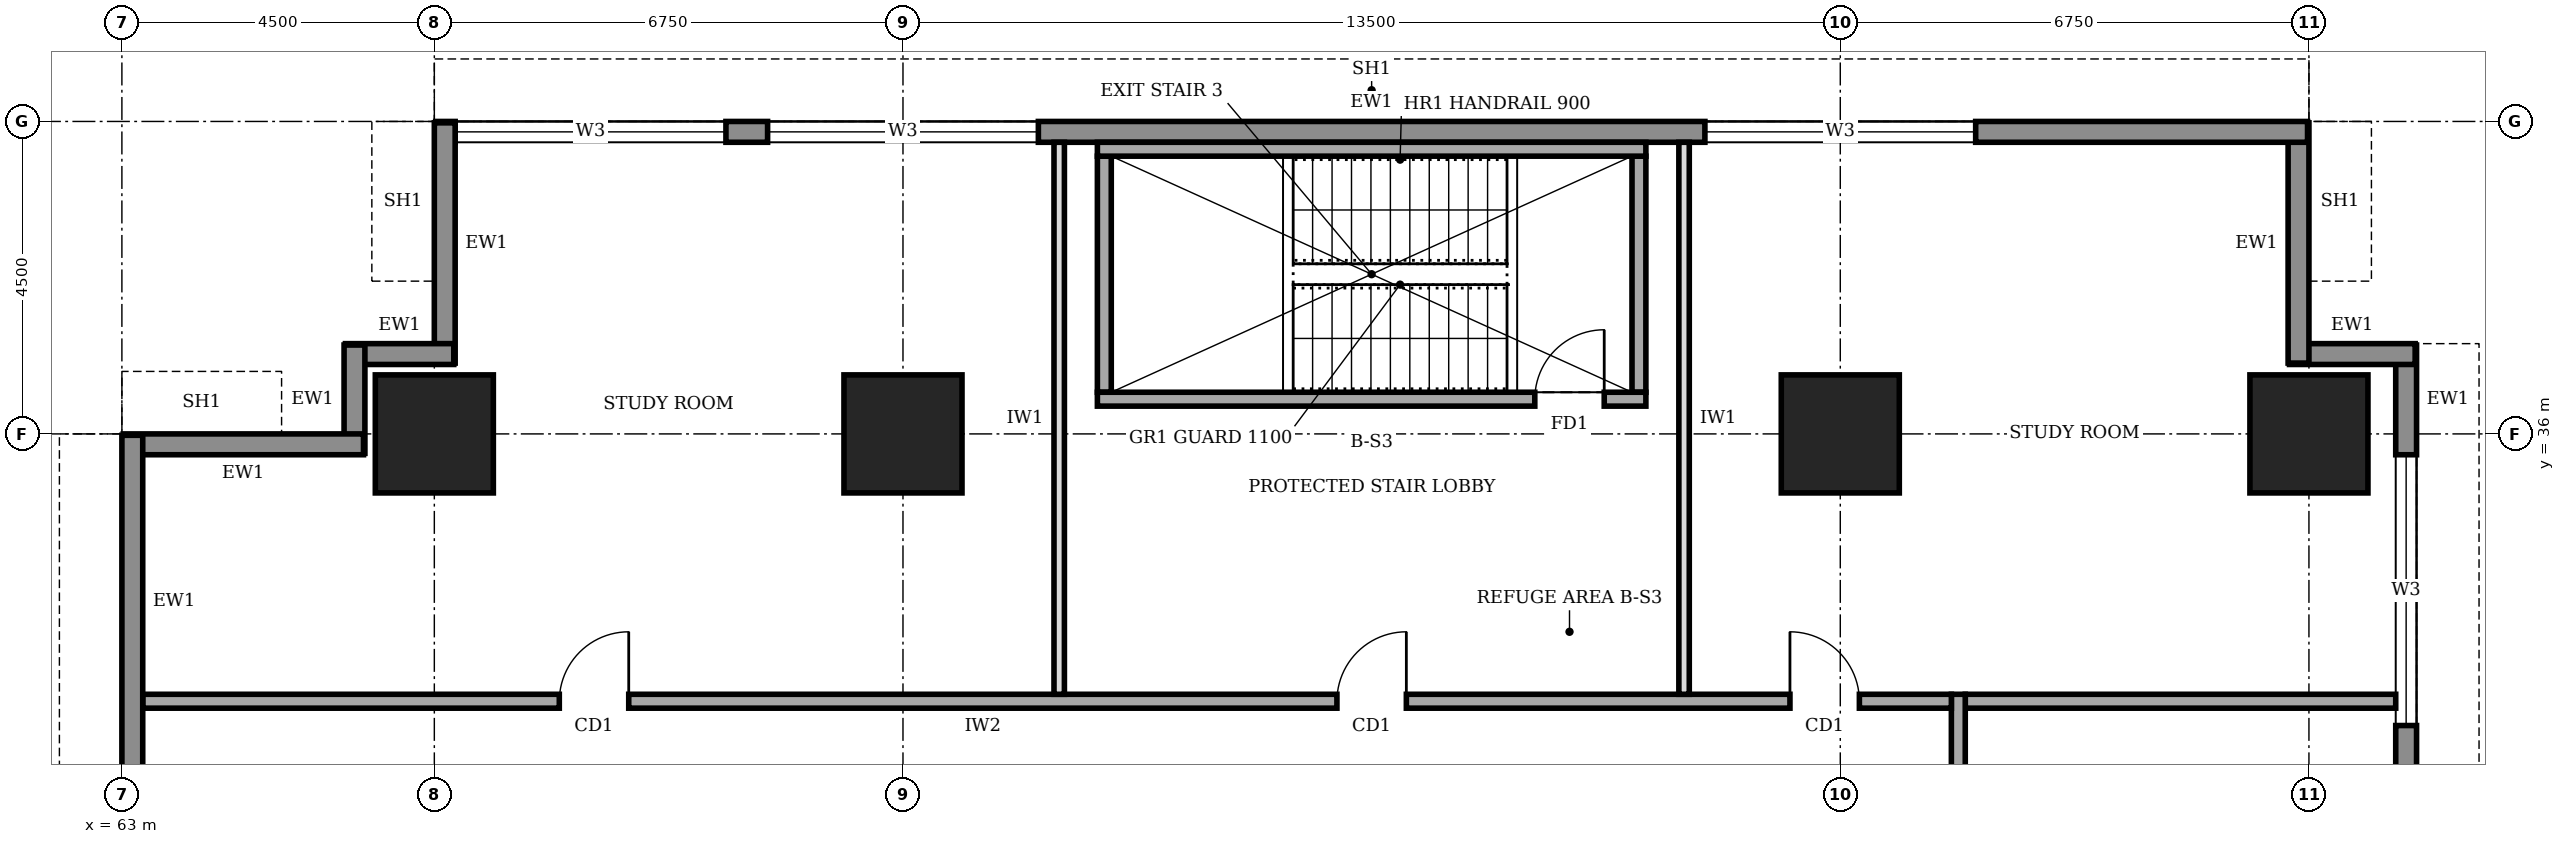
"""IFC4 building model, lengths in metres.
Left out: names, types, materials, properties, quantities, classifications, styles, units other than length and angle.
Written with IfcOpenShell. Run it as: python <this file> out.ifc"""

import sys

from ifc_helpers import new_model, si_unit, direction, frame, frame_2d, origin, origin_2d, place, context, subcontext, project, spatial, rectangle, extrude, element, fill, save


model = new_model("IFC4")
c1 = context("Model", 3, precision=1e-05, world=origin(), true_north=direction((0.0, 1.0)))
c2 = subcontext(c1, "Body", "Model", "MODEL_VIEW")
j1 = project(units=[si_unit("LENGTHUNIT", "METRE"), si_unit("PLANEANGLEUNIT", "RADIAN")], contexts=[c1])
p1 = place(None, origin())
s1 = spatial("IfcSite", under=j1, at=p1, CompositionType="ELEMENT")
p2 = place(p1, origin())
s2 = spatial("IfcBuilding", under=s1, at=p2, CompositionType="ELEMENT")
p3 = place(p2, frame((0.0, 0.0, 97.0)))
s3 = spatial("IfcBuildingStorey", under=s2, at=p3, CompositionType="ELEMENT", Elevation=97.0)
for number, where, z_axis, x_axis in (
    (1, (67.5, 36.0, 0.0), (0.0, 0.0, 1.0), (1.0, 0.0, 0.0)),
    (2, (74.25, 36.0, 0.0), (0.0, 0.0, 1.0), (1.0, 0.0, 0.0)),
    (3, (87.75, 36.0, 0.0), (0.0, 0.0, 1.0), (1.0, 0.0, 0.0)),
    (4, (94.5, 36.0, 0.0), (0.0, 0.0, 1.0), (1.0, 0.0, 0.0)),
):
    element("IfcColumn", number, at=place(p3, frame(where, z_axis=z_axis, x_axis=x_axis)), inside=s3, PredefinedType="COLUMN", context=c2, shape_type="SweptSolid", body=[
        extrude(rectangle(XDim=1.7, YDim=1.7, at=origin_2d()), origin(), (0.0, 0.0, 1.0), 4.0),
    ])
p4 = place(p3, frame((95.9, 3.32, 0.0), z_axis=(0.0, 0.0, 1.0), x_axis=(0.0, 1.0, 0.0)))
e5 = element("IfcWall", 5, at=p4, inside=s3, PredefinedType="STANDARD", context=c2, shape_type="SweptSolid", body=[
    extrude(rectangle(XDim=33.96, YDim=0.3, at=frame_2d((16.98, 0.0))), origin(), (0.0, 0.0, 1.0), 3.75),
])
p5 = place(p4, frame((1.48, 0.0, 0.95)))
e6 = element("IfcOpeningElement", 6, at=p5, cuts=e5, PredefinedType="OPENING", context=c2, shape_type="SweptSolid", body=[
    extrude(rectangle(XDim=3.9, YDim=1.8, at=frame_2d((1.95, 0.9))), frame((0.0, 0.16, 0.0), z_axis=(0.0, -1.0, 0.0), x_axis=(1.0, 0.0, 0.0)), (0.0, 0.0, 1.0), 0.32),
])
p6 = place(p4, frame((5.98, 0.0, 0.95)))
e7 = element("IfcOpeningElement", 7, at=p6, cuts=e5, PredefinedType="OPENING", context=c2, shape_type="SweptSolid", body=[
    extrude(rectangle(XDim=3.9, YDim=1.8, at=frame_2d((1.95, 0.9))), frame((0.0, 0.16, 0.0), z_axis=(0.0, -1.0, 0.0), x_axis=(1.0, 0.0, 0.0)), (0.0, 0.0, 1.0), 0.32),
])
p7 = place(p4, frame((10.48, 0.0, 0.95)))
e8 = element("IfcOpeningElement", 8, at=p7, cuts=e5, PredefinedType="OPENING", context=c2, shape_type="SweptSolid", body=[
    extrude(rectangle(XDim=3.9, YDim=1.8, at=frame_2d((1.95, 0.9))), frame((0.0, 0.16, 0.0), z_axis=(0.0, -1.0, 0.0), x_axis=(1.0, 0.0, 0.0)), (0.0, 0.0, 1.0), 0.32),
])
p8 = place(p4, frame((14.98, 0.0, 0.95)))
e9 = element("IfcOpeningElement", 9, at=p8, cuts=e5, PredefinedType="OPENING", context=c2, shape_type="SweptSolid", body=[
    extrude(rectangle(XDim=3.9, YDim=1.8, at=frame_2d((1.95, 0.9))), frame((0.0, 0.16, 0.0), z_axis=(0.0, -1.0, 0.0), x_axis=(1.0, 0.0, 0.0)), (0.0, 0.0, 1.0), 0.32),
])
p9 = place(p4, frame((19.48, 0.0, 0.95)))
e10 = element("IfcOpeningElement", 10, at=p9, cuts=e5, PredefinedType="OPENING", context=c2, shape_type="SweptSolid", body=[
    extrude(rectangle(XDim=3.9, YDim=1.8, at=frame_2d((1.95, 0.9))), frame((0.0, 0.16, 0.0), z_axis=(0.0, -1.0, 0.0), x_axis=(1.0, 0.0, 0.0)), (0.0, 0.0, 1.0), 0.32),
])
p10 = place(p4, frame((23.98, 0.0, 0.95)))
e11 = element("IfcOpeningElement", 11, at=p10, cuts=e5, PredefinedType="OPENING", context=c2, shape_type="SweptSolid", body=[
    extrude(rectangle(XDim=3.9, YDim=1.8, at=frame_2d((1.95, 0.9))), frame((0.0, 0.16, 0.0), z_axis=(0.0, -1.0, 0.0), x_axis=(1.0, 0.0, 0.0)), (0.0, 0.0, 1.0), 0.32),
])
p11 = place(p4, frame((28.48, 0.0, 0.95)))
e12 = element("IfcOpeningElement", 12, at=p11, cuts=e5, PredefinedType="OPENING", context=c2, shape_type="SweptSolid", body=[
    extrude(rectangle(XDim=3.9, YDim=1.8, at=frame_2d((1.95, 0.9))), frame((0.0, 0.16, 0.0), z_axis=(0.0, -1.0, 0.0), x_axis=(1.0, 0.0, 0.0)), (0.0, 0.0, 1.0), 0.32),
])
p12 = place(p3, frame((96.03, 37.15, 0.0), z_axis=(0.0, 0.0, 1.0), x_axis=(-1.0, 0.0, 0.0)))
e13 = element("IfcWall", 13, at=p12, inside=s3, PredefinedType="STANDARD", context=c2, shape_type="SweptSolid", body=[
    extrude(rectangle(XDim=1.81, YDim=0.3, at=frame_2d((0.905, 0.0))), origin(), (0.0, 0.0, 1.0), 3.75),
])
p13 = place(p3, frame((94.35, 37.02, 0.0), z_axis=(0.0, 0.0, 1.0), x_axis=(0.0, 1.0, 0.0)))
e14 = element("IfcWall", 14, at=p13, inside=s3, PredefinedType="STANDARD", context=c2, shape_type="SweptSolid", body=[
    extrude(rectangle(XDim=3.46, YDim=0.3, at=frame_2d((1.73, 0.0))), origin(), (0.0, 0.0, 1.0), 2.85),
])
p14 = place(p3, frame((94.48, 40.35, 0.0), z_axis=(0.0, 0.0, 1.0), x_axis=(-1.0, 0.0, 0.0)))
e15 = element("IfcWall", 15, at=p14, inside=s3, PredefinedType="STANDARD", context=c2, shape_type="SweptSolid", body=[
    extrude(rectangle(XDim=26.96, YDim=0.3, at=frame_2d((13.48, 0.0))), origin(), (0.0, 0.0, 1.0), 3.75),
])
p15 = place(p14, frame((22.78, 0.0, 0.95)))
e16 = element("IfcOpeningElement", 16, at=p15, cuts=e15, PredefinedType="OPENING", context=c2, shape_type="SweptSolid", body=[
    extrude(rectangle(XDim=3.9, YDim=1.8, at=frame_2d((1.95, 0.9))), frame((0.0, 0.16, 0.0), z_axis=(0.0, -1.0, 0.0), x_axis=(1.0, 0.0, 0.0)), (0.0, 0.0, 1.0), 0.32),
])
p16 = place(p14, frame((18.28, 0.0, 0.95)))
e17 = element("IfcOpeningElement", 17, at=p16, cuts=e15, PredefinedType="OPENING", context=c2, shape_type="SweptSolid", body=[
    extrude(rectangle(XDim=3.9, YDim=1.8, at=frame_2d((1.95, 0.9))), frame((0.0, 0.16, 0.0), z_axis=(0.0, -1.0, 0.0), x_axis=(1.0, 0.0, 0.0)), (0.0, 0.0, 1.0), 0.32),
])
p17 = place(p14, frame((4.78, 0.0, 0.95)))
e18 = element("IfcOpeningElement", 18, at=p17, cuts=e15, PredefinedType="OPENING", context=c2, shape_type="SweptSolid", body=[
    extrude(rectangle(XDim=3.9, YDim=1.8, at=frame_2d((1.95, 0.9))), frame((0.0, 0.16, 0.0), z_axis=(0.0, -1.0, 0.0), x_axis=(1.0, 0.0, 0.0)), (0.0, 0.0, 1.0), 0.32),
])
p18 = place(p3, frame((67.65, 40.48, 0.0), z_axis=(0.0, 0.0, 1.0), x_axis=(0.0, -1.0, 0.0)))
e19 = element("IfcWall", 19, at=p18, inside=s3, PredefinedType="STANDARD", context=c2, shape_type="SweptSolid", body=[
    extrude(rectangle(XDim=3.46, YDim=0.3, at=frame_2d((1.73, 0.0))), origin(), (0.0, 0.0, 1.0), 2.85),
])
for number, where, z_axis, x_axis in (
    (20, (67.78, 37.15, 0.0), (0.0, 0.0, 1.0), (-1.0, 0.0, 0.0)),
    (21, (66.35, 37.28, 0.0), (0.0, 0.0, 1.0), (0.0, -1.0, 0.0)),
):
    element("IfcWall", number, at=place(p3, frame(where, z_axis=z_axis, x_axis=x_axis)), inside=s3, PredefinedType="STANDARD", context=c2, shape_type="SweptSolid", body=[
        extrude(rectangle(XDim=1.56, YDim=0.3, at=frame_2d((0.78, 0.0))), origin(), (0.0, 0.0, 1.0), 3.75),
    ])
p19 = place(p3, frame((66.48, 35.85, 0.0), z_axis=(0.0, 0.0, 1.0), x_axis=(-1.0, 0.0, 0.0)))
e22 = element("IfcWall", 22, at=p19, inside=s3, PredefinedType="STANDARD", context=c2, shape_type="SweptSolid", body=[
    extrude(rectangle(XDim=3.46, YDim=0.3, at=frame_2d((1.73, 0.0))), origin(), (0.0, 0.0, 1.0), 2.85),
])
p20 = place(p3, frame((63.15, 35.98, 0.0), z_axis=(0.0, 0.0, 1.0), x_axis=(0.0, -1.0, 0.0)))
e23 = element("IfcWall", 23, at=p20, inside=s3, PredefinedType="STANDARD", context=c2, shape_type="SweptSolid", body=[
    extrude(rectangle(XDim=31.46, YDim=0.3, at=frame_2d((15.73, 0.0))), origin(), (0.0, 0.0, 1.0), 3.75),
])
p21 = place(p20, frame((27.28, 0.0, 0.95)))
e24 = element("IfcOpeningElement", 24, at=p21, cuts=e23, PredefinedType="OPENING", context=c2, shape_type="SweptSolid", body=[
    extrude(rectangle(XDim=3.9, YDim=1.8, at=frame_2d((1.95, 0.9))), frame((0.0, 0.16, 0.0), z_axis=(0.0, -1.0, 0.0), x_axis=(1.0, 0.0, 0.0)), (0.0, 0.0, 1.0), 0.32),
])
p22 = place(p20, frame((22.78, 0.0, 0.95)))
e25 = element("IfcOpeningElement", 25, at=p22, cuts=e23, PredefinedType="OPENING", context=c2, shape_type="SweptSolid", body=[
    extrude(rectangle(XDim=3.9, YDim=1.8, at=frame_2d((1.95, 0.9))), frame((0.0, 0.16, 0.0), z_axis=(0.0, -1.0, 0.0), x_axis=(1.0, 0.0, 0.0)), (0.0, 0.0, 1.0), 0.32),
])
p23 = place(p20, frame((18.28, 0.0, 0.95)))
e26 = element("IfcOpeningElement", 26, at=p23, cuts=e23, PredefinedType="OPENING", context=c2, shape_type="SweptSolid", body=[
    extrude(rectangle(XDim=3.9, YDim=1.8, at=frame_2d((1.95, 0.9))), frame((0.0, 0.16, 0.0), z_axis=(0.0, -1.0, 0.0), x_axis=(1.0, 0.0, 0.0)), (0.0, 0.0, 1.0), 0.32),
])
p24 = place(p20, frame((13.78, 0.0, 0.95)))
e27 = element("IfcOpeningElement", 27, at=p24, cuts=e23, PredefinedType="OPENING", context=c2, shape_type="SweptSolid", body=[
    extrude(rectangle(XDim=3.9, YDim=1.8, at=frame_2d((1.95, 0.9))), frame((0.0, 0.16, 0.0), z_axis=(0.0, -1.0, 0.0), x_axis=(1.0, 0.0, 0.0)), (0.0, 0.0, 1.0), 0.32),
])
p25 = place(p20, frame((9.28, 0.0, 0.95)))
e28 = element("IfcOpeningElement", 28, at=p25, cuts=e23, PredefinedType="OPENING", context=c2, shape_type="SweptSolid", body=[
    extrude(rectangle(XDim=3.9, YDim=1.8, at=frame_2d((1.95, 0.9))), frame((0.0, 0.16, 0.0), z_axis=(0.0, -1.0, 0.0), x_axis=(1.0, 0.0, 0.0)), (0.0, 0.0, 1.0), 0.32),
])
p26 = place(p20, frame((4.78, 0.0, 0.95)))
e29 = element("IfcOpeningElement", 29, at=p26, cuts=e23, PredefinedType="OPENING", context=c2, shape_type="SweptSolid", body=[
    extrude(rectangle(XDim=3.9, YDim=1.8, at=frame_2d((1.95, 0.9))), frame((0.0, 0.16, 0.0), z_axis=(0.0, -1.0, 0.0), x_axis=(1.0, 0.0, 0.0)), (0.0, 0.0, 1.0), 0.32),
])
p27 = place(p3, frame((89.45, 8.45, 0.0), z_axis=(0.0, 0.0, 1.0), x_axis=(0.0, 1.0, 0.0)))
e30 = element("IfcWall", 30, at=p27, inside=s3, PredefinedType="SOLIDWALL", context=c2, shape_type="SweptSolid", body=[
    extrude(rectangle(XDim=23.8, YDim=0.2, at=frame_2d((11.9, 0.0))), origin(), (0.0, 0.0, 1.0), 3.75),
])
p28 = place(p27, frame((1.925, 0.0, 0.0)))
e31 = element("IfcOpeningElement", 31, at=p28, cuts=e30, PredefinedType="OPENING", context=c2, shape_type="SweptSolid", body=[
    extrude(rectangle(XDim=1.0, YDim=2.1, at=frame_2d((0.5, 1.05))), frame((0.0, 0.11, 0.0), z_axis=(0.0, -1.0, 0.0), x_axis=(1.0, 0.0, 0.0)), (0.0, 0.0, 1.0), 0.22),
])
p29 = place(p27, frame((6.5, 0.0, 0.0)))
e32 = element("IfcOpeningElement", 32, at=p29, cuts=e30, PredefinedType="OPENING", context=c2, shape_type="SweptSolid", body=[
    extrude(rectangle(XDim=0.9, YDim=2.1, at=frame_2d((0.45, 1.05))), frame((0.0, 0.11, 0.0), z_axis=(0.0, -1.0, 0.0), x_axis=(1.0, 0.0, 0.0)), (0.0, 0.0, 1.0), 0.22),
])
p30 = place(p27, frame((9.5, 0.0, 0.0)))
e33 = element("IfcOpeningElement", 33, at=p30, cuts=e30, PredefinedType="OPENING", context=c2, shape_type="SweptSolid", body=[
    extrude(rectangle(XDim=0.9, YDim=2.1, at=frame_2d((0.45, 1.05))), frame((0.0, 0.11, 0.0), z_axis=(0.0, -1.0, 0.0), x_axis=(1.0, 0.0, 0.0)), (0.0, 0.0, 1.0), 0.22),
])
p31 = place(p27, frame((14.35, 0.0, 0.0)))
e34 = element("IfcOpeningElement", 34, at=p31, cuts=e30, PredefinedType="OPENING", context=c2, shape_type="SweptSolid", body=[
    extrude(rectangle(XDim=0.9, YDim=2.1, at=frame_2d((0.45, 1.05))), frame((0.0, 0.11, 0.0), z_axis=(0.0, -1.0, 0.0), x_axis=(1.0, 0.0, 0.0)), (0.0, 0.0, 1.0), 0.22),
])
p32 = place(p27, frame((17.05, 0.0, 0.0)))
e35 = element("IfcOpeningElement", 35, at=p32, cuts=e30, PredefinedType="OPENING", context=c2, shape_type="SweptSolid", body=[
    extrude(rectangle(XDim=1.0, YDim=2.1, at=frame_2d((0.5, 1.05))), frame((0.0, 0.11, 0.0), z_axis=(0.0, -1.0, 0.0), x_axis=(1.0, 0.0, 0.0)), (0.0, 0.0, 1.0), 0.22),
])
p33 = place(p27, frame((11.55, 0.0, 0.0)))
e36 = element("IfcOpeningElement", 36, at=p33, cuts=e30, PredefinedType="OPENING", context=c2, shape_type="SweptSolid", body=[
    extrude(rectangle(XDim=1.0, YDim=2.1, at=frame_2d((0.5, 1.05))), frame((0.0, 0.11, 0.0), z_axis=(0.0, -1.0, 0.0), x_axis=(1.0, 0.0, 0.0)), (0.0, 0.0, 1.0), 0.22),
])
p34 = place(p27, frame((20.675, 0.0, 0.0)))
e37 = element("IfcOpeningElement", 37, at=p34, cuts=e30, PredefinedType="OPENING", context=c2, shape_type="SweptSolid", body=[
    extrude(rectangle(XDim=1.0, YDim=2.1, at=frame_2d((0.5, 1.05))), frame((0.0, 0.11, 0.0), z_axis=(0.0, -1.0, 0.0), x_axis=(1.0, 0.0, 0.0)), (0.0, 0.0, 1.0), 0.22),
])
p35 = place(p3, frame((89.35, 32.15, 0.0), z_axis=(0.0, 0.0, 1.0), x_axis=(-1.0, 0.0, 0.0)))
e38 = element("IfcWall", 38, at=p35, inside=s3, PredefinedType="SOLIDWALL", context=c2, shape_type="SweptSolid", body=[
    extrude(rectangle(XDim=26.05, YDim=0.2, at=frame_2d((13.025, 0.0))), origin(), (0.0, 0.0, 1.0), 3.75),
])
p36 = place(p35, frame((19.05, 0.0, 0.0)))
e39 = element("IfcOpeningElement", 39, at=p36, cuts=e38, PredefinedType="OPENING", context=c2, shape_type="SweptSolid", body=[
    extrude(rectangle(XDim=1.0, YDim=2.1, at=frame_2d((0.5, 1.05))), frame((0.0, 0.11, 0.0), z_axis=(0.0, -1.0, 0.0), x_axis=(1.0, 0.0, 0.0)), (0.0, 0.0, 1.0), 0.22),
])
p37 = place(p35, frame((7.85, 0.0, 0.0)))
e40 = element("IfcOpeningElement", 40, at=p37, cuts=e38, PredefinedType="OPENING", context=c2, shape_type="SweptSolid", body=[
    extrude(rectangle(XDim=1.0, YDim=2.1, at=frame_2d((0.5, 1.05))), frame((0.0, 0.11, 0.0), z_axis=(0.0, -1.0, 0.0), x_axis=(1.0, 0.0, 0.0)), (0.0, 0.0, 1.0), 0.22),
])
p38 = place(p35, frame((1.325, 0.0, 0.0)))
e41 = element("IfcOpeningElement", 41, at=p38, cuts=e38, PredefinedType="OPENING", context=c2, shape_type="SweptSolid", body=[
    extrude(rectangle(XDim=1.0, YDim=2.1, at=frame_2d((0.5, 1.05))), frame((0.0, 0.11, 0.0), z_axis=(0.0, -1.0, 0.0), x_axis=(1.0, 0.0, 0.0)), (0.0, 0.0, 1.0), 0.22),
])
p39 = place(p3, frame((89.55, 32.15, 0.0), z_axis=(0.0, 0.0, 1.0), x_axis=(1.0, 0.0, 0.0)))
e42 = element("IfcWall", 42, at=p39, inside=s3, PredefinedType="SOLIDWALL", context=c2, shape_type="SweptSolid", body=[
    extrude(rectangle(XDim=6.2, YDim=0.2, at=frame_2d((3.1, 0.0))), origin(), (0.0, 0.0, 1.0), 3.75),
])
for number, where, z_axis, x_axis in (
    (43, (76.5, 32.25, 0.0), (0.0, 0.0, 1.0), (0.0, 1.0, 0.0)),
    (44, (85.5, 32.25, 0.0), (0.0, 0.0, 1.0), (0.0, 1.0, 0.0)),
):
    element("IfcWall", number, at=place(p3, frame(where, z_axis=z_axis, x_axis=x_axis)), inside=s3, PredefinedType="PARTITIONING", context=c2, shape_type="SweptSolid", body=[
        extrude(rectangle(XDim=7.95, YDim=0.15, at=frame_2d((3.975, 0.0))), origin(), (0.0, 0.0, 1.0), 3.75),
    ])
p40 = place(p3, frame((77.05, 36.5, 0.0), z_axis=(0.0, 0.0, 1.0), x_axis=(1.0, 0.0, 0.0)))
e45 = element("IfcWall", 45, at=p40, inside=s3, PredefinedType="SOLIDWALL", context=c2, shape_type="SweptSolid", body=[
    extrude(rectangle(XDim=7.9, YDim=0.2, at=frame_2d((3.95, 0.0))), origin(), (0.0, 0.0, 1.0), 3.75),
])
p41 = place(p40, frame((6.3, 0.0, 0.0)))
e46 = element("IfcOpeningElement", 46, at=p41, cuts=e45, PredefinedType="OPENING", context=c2, shape_type="SweptSolid", body=[
    extrude(rectangle(XDim=1.0, YDim=2.1, at=frame_2d((0.5, 1.05))), frame((0.0, 0.11, 0.0), z_axis=(0.0, -1.0, 0.0), x_axis=(1.0, 0.0, 0.0)), (0.0, 0.0, 1.0), 0.22),
])
p42 = place(p3, frame((77.05, 40.1, 0.0), z_axis=(0.0, 0.0, 1.0), x_axis=(1.0, 0.0, 0.0)))
e47 = element("IfcWall", 47, at=p42, inside=s3, PredefinedType="SOLIDWALL", context=c2, shape_type="SweptSolid", body=[
    extrude(rectangle(XDim=7.9, YDim=0.2, at=frame_2d((3.95, 0.0))), origin(), (0.0, 0.0, 1.0), 3.75),
])
for number, where, z_axis, x_axis in (
    (48, (77.15, 36.6, 0.0), (0.0, 0.0, 1.0), (0.0, 1.0, 0.0)),
    (49, (84.85, 36.6, 0.0), (0.0, 0.0, 1.0), (0.0, 1.0, 0.0)),
):
    element("IfcWall", number, at=place(p3, frame(where, z_axis=z_axis, x_axis=x_axis)), inside=s3, PredefinedType="SOLIDWALL", context=c2, shape_type="SweptSolid", body=[
        extrude(rectangle(XDim=3.4, YDim=0.2, at=frame_2d((1.7, 0.0))), origin(), (0.0, 0.0, 1.0), 3.75),
    ])
p43 = place(p11, origin())
e50 = element("IfcWindow", 50, at=p43, inside=s3, PartitioningType="SINGLE_PANEL", PredefinedType="WINDOW", context=c2, shape_type="SweptSolid", body=[
    extrude(rectangle(XDim=3.9, YDim=1.8, at=frame_2d((1.95, 0.9))), frame((0.0, 0.03, 0.0), z_axis=(0.0, -1.0, 0.0), x_axis=(1.0, 0.0, 0.0)), (0.0, 0.0, 1.0), 0.06),
])
fill(e12, e50)
p44 = place(p15, origin())
e51 = element("IfcWindow", 51, at=p44, inside=s3, PartitioningType="SINGLE_PANEL", PredefinedType="WINDOW", context=c2, shape_type="SweptSolid", body=[
    extrude(rectangle(XDim=3.9, YDim=1.8, at=frame_2d((1.95, 0.9))), frame((0.0, 0.03, 0.0), z_axis=(0.0, -1.0, 0.0), x_axis=(1.0, 0.0, 0.0)), (0.0, 0.0, 1.0), 0.06),
])
fill(e16, e51)
p45 = place(p16, origin())
e52 = element("IfcWindow", 52, at=p45, inside=s3, PartitioningType="SINGLE_PANEL", PredefinedType="WINDOW", context=c2, shape_type="SweptSolid", body=[
    extrude(rectangle(XDim=3.9, YDim=1.8, at=frame_2d((1.95, 0.9))), frame((0.0, 0.03, 0.0), z_axis=(0.0, -1.0, 0.0), x_axis=(1.0, 0.0, 0.0)), (0.0, 0.0, 1.0), 0.06),
])
fill(e17, e52)
p46 = place(p17, origin())
e53 = element("IfcWindow", 53, at=p46, inside=s3, PartitioningType="SINGLE_PANEL", PredefinedType="WINDOW", context=c2, shape_type="SweptSolid", body=[
    extrude(rectangle(XDim=3.9, YDim=1.8, at=frame_2d((1.95, 0.9))), frame((0.0, 0.03, 0.0), z_axis=(0.0, -1.0, 0.0), x_axis=(1.0, 0.0, 0.0)), (0.0, 0.0, 1.0), 0.06),
])
fill(e18, e53)
p47 = place(p36, frame((1.0, 0.0, 0.0), z_axis=(0.0, 0.0, 1.0), x_axis=(-1.0, 0.0, 0.0)))
e54 = element("IfcDoor", 54, at=p47, inside=s3, OperationType="SINGLE_SWING_RIGHT", PredefinedType="DOOR", context=c2, shape_type="SweptSolid", body=[
    extrude(rectangle(XDim=1.0, YDim=2.1, at=frame_2d((0.5, 1.05))), frame((0.0, 0.025, 0.0), z_axis=(0.0, -1.0, 0.0), x_axis=(1.0, 0.0, 0.0)), (0.0, 0.0, 1.0), 0.05),
])
fill(e39, e54)
p48 = place(p37, frame((1.0, 0.0, 0.0), z_axis=(0.0, 0.0, 1.0), x_axis=(-1.0, 0.0, 0.0)))
e55 = element("IfcDoor", 55, at=p48, inside=s3, OperationType="SINGLE_SWING_RIGHT", PredefinedType="DOOR", context=c2, shape_type="SweptSolid", body=[
    extrude(rectangle(XDim=1.0, YDim=2.1, at=frame_2d((0.5, 1.05))), frame((0.0, 0.025, 0.0), z_axis=(0.0, -1.0, 0.0), x_axis=(1.0, 0.0, 0.0)), (0.0, 0.0, 1.0), 0.05),
])
fill(e40, e55)
p49 = place(p38, frame((1.0, 0.0, 0.0), z_axis=(0.0, 0.0, 1.0), x_axis=(-1.0, 0.0, 0.0)))
e56 = element("IfcDoor", 56, at=p49, inside=s3, OperationType="SINGLE_SWING_LEFT", PredefinedType="DOOR", context=c2, shape_type="SweptSolid", body=[
    extrude(rectangle(XDim=1.0, YDim=2.1, at=frame_2d((0.5, 1.05))), frame((0.0, 0.025, 0.0), z_axis=(0.0, -1.0, 0.0), x_axis=(1.0, 0.0, 0.0)), (0.0, 0.0, 1.0), 0.05),
])
fill(e41, e56)
p50 = place(p41, origin())
e57 = element("IfcDoor", 57, at=p50, inside=s3, OperationType="SINGLE_SWING_RIGHT", PredefinedType="DOOR", context=c2, shape_type="SweptSolid", body=[
    extrude(rectangle(XDim=1.0, YDim=2.1, at=frame_2d((0.5, 1.05))), frame((0.0, 0.025, 0.0), z_axis=(0.0, -1.0, 0.0), x_axis=(1.0, 0.0, 0.0)), (0.0, 0.0, 1.0), 0.05),
])
fill(e46, e57)
save(model, sys.argv[1])
